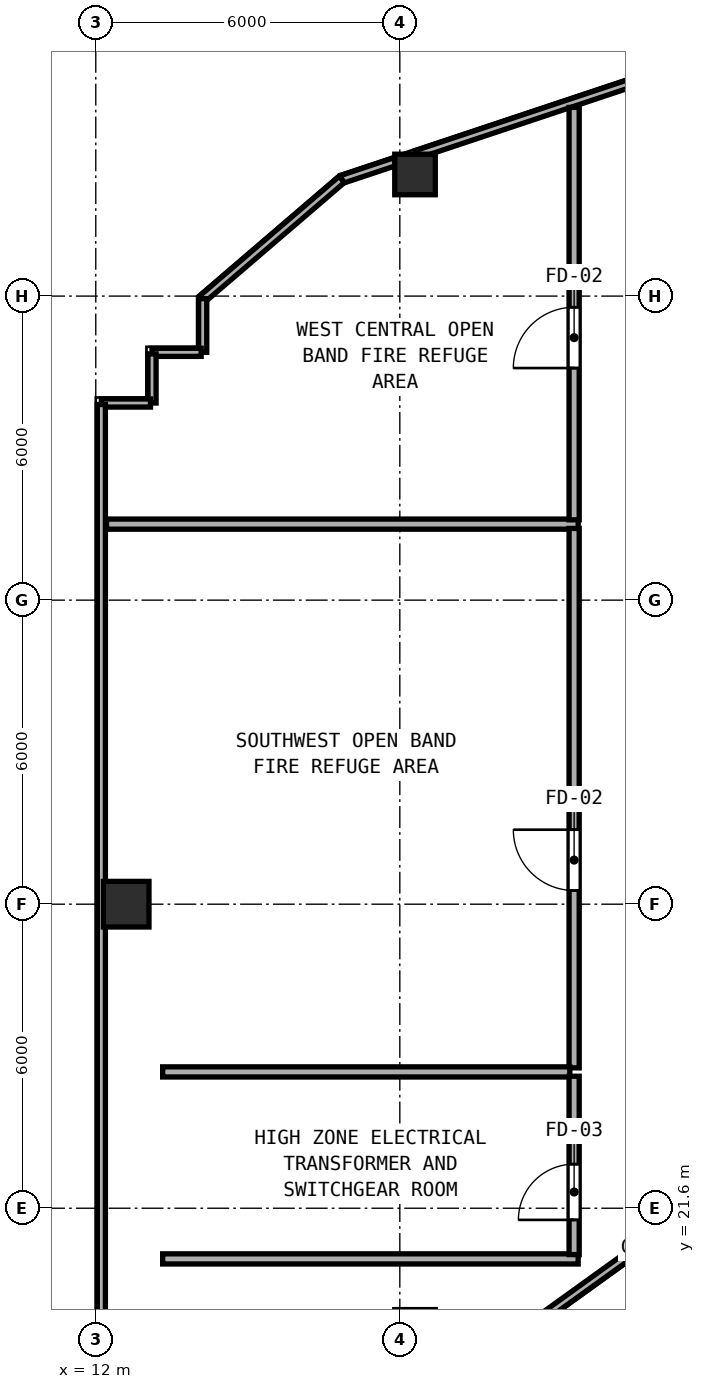
"""IFC4 building model, lengths in metres.
Left out: names, types, materials, properties, quantities, classifications, styles, units other than length and angle.
Written with IfcOpenShell. Run it as: python <this file> out.ifc"""

import sys

from ifc_helpers import new_model, si_unit, direction, frame, frame_2d, origin, origin_2d, place, context, subcontext, project, spatial, rectangle, hollow_rectangle, extrude, element, fill, save


model = new_model("IFC4")
c1 = context("Model", 3, precision=1e-05, world=origin(), true_north=direction((0.0, 1.0)))
c2 = subcontext(c1, "Body", "Model", "MODEL_VIEW")
j1 = project(units=[si_unit("LENGTHUNIT", "METRE"), si_unit("PLANEANGLEUNIT", "RADIAN")], contexts=[c1])
p1 = place(None, origin())
s1 = spatial("IfcSite", under=j1, at=p1, CompositionType="ELEMENT")
p2 = place(p1, origin())
s2 = spatial("IfcBuilding", under=s1, at=p2, CompositionType="ELEMENT")
p3 = place(p2, frame((0.0, 0.0, 230.6)))
s3 = spatial("IfcBuildingStorey", under=s2, at=p3, CompositionType="ELEMENT", Elevation=230.6)
p4 = place(p3, frame((12.6, 27.6, 0.0), z_axis=(0.0, 0.0, 1.0), x_axis=(1.0, 0.0, 0.0)))
e1 = element("IfcColumn", 1, at=p4, inside=s3, PredefinedType="COLUMN", context=c2, shape_type="SweptSolid", body=[
    extrude(hollow_rectangle(XDim=0.9, YDim=0.9, WallThickness=0.034, at=origin_2d()), origin(), (0.0, 0.0, 1.0), 4.6),
])
p5 = place(p3, frame((18.3, 42.0, 0.0), z_axis=(0.0, 0.0, 1.0), x_axis=(1.0, 0.0, 0.0)))
e2 = element("IfcColumn", 2, at=p5, inside=s3, PredefinedType="COLUMN", context=c2, shape_type="SweptSolid", body=[
    extrude(hollow_rectangle(XDim=0.8, YDim=0.8, WallThickness=0.03, at=origin_2d()), origin(), (0.0, 0.0, 1.0), 4.6),
])
p6 = place(p3, frame((24.082, 44.311, 0.0), z_axis=(0.0, 0.0, 1.0), x_axis=(-0.948687320562, -0.316215698225, 0.0)))
e3 = element("IfcWall", 3, at=p6, inside=s3, PredefinedType="PARAPET", context=c2, shape_type="SweptSolid", body=[
    extrude(rectangle(XDim=6.069, YDim=0.16, at=frame_2d((3.035, 0.0))), origin(), (0.0, 0.0, 1.0), 1.15),
])
p7 = place(p3, frame((17.908, 42.253, 0.0), z_axis=(0.0, 0.0, 1.0), x_axis=(-0.948705297269, -0.316161760709, 0.0)))
e4 = element("IfcWall", 4, at=p7, inside=s3, PredefinedType="PARAPET", context=c2, shape_type="SweptSolid", body=[
    extrude(rectangle(XDim=1.11, YDim=0.16, at=frame_2d((0.555, 0.0))), origin(), (0.0, 0.0, 1.0), 1.15),
])
p8 = place(p3, frame((16.855, 41.903, 0.0), z_axis=(0.0, 0.0, 1.0), x_axis=(-0.759213704594, -0.650841417518, 0.0)))
e5 = element("IfcWall", 5, at=p8, inside=s3, PredefinedType="PARAPET", context=c2, shape_type="SweptSolid", body=[
    extrude(rectangle(XDim=3.616, YDim=0.16, at=frame_2d((1.808, 0.0))), origin(), (0.0, 0.0, 1.0), 1.15),
])
p9 = place(p3, frame((14.11, 39.549, 0.0), z_axis=(0.0, 0.0, 1.0), x_axis=(0.0, -1.0, 0.0)))
e6 = element("IfcWall", 6, at=p9, inside=s3, PredefinedType="PARAPET", context=c2, shape_type="SweptSolid", body=[
    extrude(rectangle(XDim=1.059, YDim=0.16, at=frame_2d((0.53, 0.0))), origin(), (0.0, 0.0, 1.0), 1.15),
])
for number, where, z_axis, x_axis in (
    (7, (14.08, 38.49, 0.0), (0.0, 0.0, 1.0), (-1.0, 0.0, 0.0)),
    (8, (13.11, 38.46, 0.0), (0.0, 0.0, 1.0), (0.0, -1.0, 0.0)),
    (9, (13.08, 37.49, 0.0), (0.0, 0.0, 1.0), (-1.0, 0.0, 0.0)),
):
    element("IfcWall", number, at=place(p3, frame(where, z_axis=z_axis, x_axis=x_axis)), inside=s3, PredefinedType="PARAPET", context=c2, shape_type="SweptSolid", body=[
        extrude(rectangle(XDim=0.97, YDim=0.16, at=frame_2d((0.485, 0.0))), origin(), (0.0, 0.0, 1.0), 1.15),
    ])
p10 = place(p3, frame((12.11, 37.46, 0.0), z_axis=(0.0, 0.0, 1.0), x_axis=(0.0, -1.0, 0.0)))
e10 = element("IfcWall", 10, at=p10, inside=s3, PredefinedType="PARAPET", context=c2, shape_type="SweptSolid", body=[
    extrude(rectangle(XDim=20.95, YDim=0.16, at=frame_2d((10.475, 0.0))), origin(), (0.0, 0.0, 1.0), 1.15),
])
p11 = place(p3, frame((14.183, 14.667, 0.0), z_axis=(0.0, 0.0, 1.0), x_axis=(0.811534341451, 0.584304725845, 0.0)))
e11 = element("IfcWall", 11, at=p11, inside=s3, PredefinedType="PARAPET", context=c2, shape_type="SweptSolid", body=[
    extrude(rectangle(XDim=11.552, YDim=0.16, at=frame_2d((5.776, 0.0))), origin(), (0.0, 0.0, 1.0), 1.15),
])
p12 = place(p3, frame((12.212, 35.1, 0.0), z_axis=(0.0, 0.0, 1.0), x_axis=(1.0, 0.0, 0.0)))
e12 = element("IfcWall", 12, at=p12, inside=s3, PredefinedType="SOLIDWALL", context=c2, shape_type="SweptSolid", body=[
    extrude(rectangle(XDim=9.308, YDim=0.2, at=frame_2d((4.654, 0.0))), origin(), (0.0, 0.0, 1.0), 4.35),
])
p13 = place(p3, frame((21.44, 24.37, 0.0), z_axis=(0.0, 0.0, 1.0), x_axis=(0.0, 1.0, 0.0)))
e13 = element("IfcWall", 13, at=p13, inside=s3, PredefinedType="SOLIDWALL", context=c2, shape_type="SweptSolid", body=[
    extrude(rectangle(XDim=10.645, YDim=0.2, at=frame_2d((5.322, 0.0))), origin(), (0.0, 0.0, 1.0), 4.35),
])
p14 = place(p13, frame((4.7, 0.0, 0.0), z_axis=(0.0, 0.0, 1.0), x_axis=(-1.0, 0.0, 0.0)))
e14 = element("IfcOpeningElement", 14, at=p14, cuts=e13, PredefinedType="OPENING", context=c2, shape_type="SweptSolid", body=[
    extrude(rectangle(XDim=1.2, YDim=2.15, at=frame_2d((0.6, 1.075))), frame((0.0, 0.11, 0.0), z_axis=(0.0, -1.0, 0.0), x_axis=(1.0, 0.0, 0.0)), (0.0, 0.0, 1.0), 0.22),
])
p15 = place(p3, frame((21.44, 35.185, 0.0), z_axis=(0.0, 0.0, 1.0), x_axis=(0.0, 1.0, 0.0)))
e15 = element("IfcWall", 15, at=p15, inside=s3, PredefinedType="SOLIDWALL", context=c2, shape_type="SweptSolid", body=[
    extrude(rectangle(XDim=8.138, YDim=0.2, at=frame_2d((4.069, 0.0))), origin(), (0.0, 0.0, 1.0), 4.35),
])
p16 = place(p15, frame((4.195, 0.0, 0.0), z_axis=(0.0, 0.0, 1.0), x_axis=(-1.0, 0.0, 0.0)))
e16 = element("IfcOpeningElement", 16, at=p16, cuts=e15, PredefinedType="OPENING", context=c2, shape_type="SweptSolid", body=[
    extrude(rectangle(XDim=1.2, YDim=2.15, at=frame_2d((0.6, 1.075))), frame((0.0, 0.11, 0.0), z_axis=(0.0, -1.0, 0.0), x_axis=(1.0, 0.0, 0.0)), (0.0, 0.0, 1.0), 0.22),
])
p17 = place(p3, frame((13.32, 24.29, 0.0), z_axis=(0.0, 0.0, 1.0), x_axis=(1.0, 0.0, 0.0)))
e17 = element("IfcWall", 17, at=p17, inside=s3, PredefinedType="SOLIDWALL", context=c2, shape_type="SweptSolid", body=[
    extrude(rectangle(XDim=8.035, YDim=0.2, at=frame_2d((4.018, 0.0))), origin(), (0.0, 0.0, 1.0), 4.35),
])
p18 = place(p3, frame((13.32, 20.6, 0.0), z_axis=(0.0, 0.0, 1.0), x_axis=(1.0, 0.0, 0.0)))
e18 = element("IfcWall", 18, at=p18, inside=s3, PredefinedType="SOLIDWALL", context=c2, shape_type="SweptSolid", body=[
    extrude(rectangle(XDim=8.2, YDim=0.2, at=frame_2d((4.1, 0.0))), origin(), (0.0, 0.0, 1.0), 4.35),
])
p19 = place(p3, frame((21.44, 20.685, 0.0), z_axis=(0.0, 0.0, 1.0), x_axis=(0.0, 1.0, 0.0)))
e19 = element("IfcWall", 19, at=p19, inside=s3, PredefinedType="SOLIDWALL", context=c2, shape_type="SweptSolid", body=[
    extrude(rectangle(XDim=3.52, YDim=0.2, at=frame_2d((1.76, 0.0))), origin(), (0.0, 0.0, 1.0), 4.35),
])
p20 = place(p19, frame((1.785, 0.0, 0.0), z_axis=(0.0, 0.0, 1.0), x_axis=(-1.0, 0.0, 0.0)))
e20 = element("IfcOpeningElement", 20, at=p20, cuts=e19, PredefinedType="OPENING", context=c2, shape_type="SweptSolid", body=[
    extrude(rectangle(XDim=1.1, YDim=2.15, at=frame_2d((0.55, 1.075))), frame((0.0, 0.11, 0.0), z_axis=(0.0, -1.0, 0.0), x_axis=(1.0, 0.0, 0.0)), (0.0, 0.0, 1.0), 0.22),
])
p21 = place(p14, origin())
e21 = element("IfcDoor", 21, at=p21, inside=s3, OperationType="SINGLE_SWING_LEFT", PredefinedType="DOOR", context=c2, shape_type="SweptSolid", body=[
    extrude(rectangle(XDim=1.2, YDim=2.15, at=frame_2d((0.6, 1.075))), frame((0.0, 0.025, 0.0), z_axis=(0.0, -1.0, 0.0), x_axis=(1.0, 0.0, 0.0)), (0.0, 0.0, 1.0), 0.05),
])
fill(e14, e21)
p22 = place(p16, origin())
e22 = element("IfcDoor", 22, at=p22, inside=s3, OperationType="SINGLE_SWING_RIGHT", PredefinedType="DOOR", context=c2, shape_type="SweptSolid", body=[
    extrude(rectangle(XDim=1.2, YDim=2.15, at=frame_2d((0.6, 1.075))), frame((0.0, 0.025, 0.0), z_axis=(0.0, -1.0, 0.0), x_axis=(1.0, 0.0, 0.0)), (0.0, 0.0, 1.0), 0.05),
])
fill(e16, e22)
p23 = place(p20, origin())
e23 = element("IfcDoor", 23, at=p23, inside=s3, OperationType="SINGLE_SWING_RIGHT", PredefinedType="DOOR", context=c2, shape_type="SweptSolid", body=[
    extrude(rectangle(XDim=1.1, YDim=2.15, at=frame_2d((0.55, 1.075))), frame((0.0, 0.025, 0.0), z_axis=(0.0, -1.0, 0.0), x_axis=(1.0, 0.0, 0.0)), (0.0, 0.0, 1.0), 0.05),
])
fill(e20, e23)
save(model, sys.argv[1])
